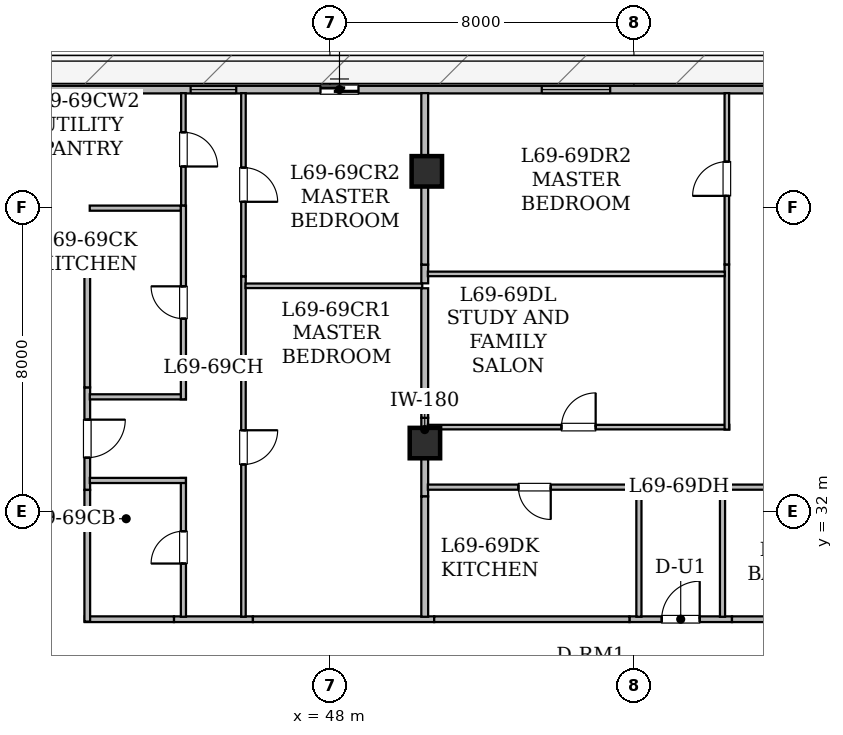
"""IFC4 building model, lengths in metres.
Left out: names, types, materials, properties, quantities, classifications, styles, units other than length and angle.
Written with IfcOpenShell. Run it as: python <this file> out.ifc"""

import sys

from ifc_helpers import new_model, si_unit, direction, frame, frame_2d, origin, origin_2d, place, context, subcontext, project, spatial, rectangle, hollow_rectangle, extrude, element, fill, save


model = new_model("IFC4")
c1 = context("Model", 3, precision=1e-05, world=origin(), true_north=direction((0.0, 1.0)))
c2 = subcontext(c1, "Body", "Model", "MODEL_VIEW")
j1 = project(units=[si_unit("LENGTHUNIT", "METRE"), si_unit("PLANEANGLEUNIT", "RADIAN")], contexts=[c1])
p1 = place(None, origin())
s1 = spatial("IfcSite", under=j1, at=p1, CompositionType="ELEMENT")
p2 = place(p1, origin())
s2 = spatial("IfcBuilding", under=s1, at=p2, CompositionType="ELEMENT")
p3 = place(p2, frame((0.0, 0.0, 269.45)))
s3 = spatial("IfcBuildingStorey", under=s2, at=p3, CompositionType="ELEMENT", Elevation=269.45)
for number, where, z_axis, x_axis in (
    (1, (50.55, 40.95, 0.025), (0.0, 0.0, 1.0), (1.0, 0.0, 0.0)),
    (2, (50.5, 33.8, 0.025), (0.0, 0.0, 1.0), (1.0, 0.0, 0.0)),
):
    element("IfcColumn", number, at=place(p3, frame(where, z_axis=z_axis, x_axis=x_axis)), inside=s3, PredefinedType="COLUMN", context=c2, shape_type="SweptSolid", body=[
        extrude(hollow_rectangle(XDim=0.8, YDim=0.8, WallThickness=0.04, at=origin_2d()), origin(), (0.0, 0.0, 1.0), 4.175),
    ])
p4 = place(p3, frame((25.702, 43.1, 0.0), z_axis=(0.0, 0.0, 1.0), x_axis=(1.0, 0.0, 0.0)))
e3 = element("IfcWall", 3, at=p4, inside=s3, PredefinedType="STANDARD", context=c2, shape_type="SweptSolid", body=[
    extrude(rectangle(XDim=38.657, YDim=0.2, at=frame_2d((19.329, 0.0))), origin(), (0.0, 0.0, 1.0), 3.95),
])
p5 = place(p4, frame((22.05, 0.0, 0.0)))
e4 = element("IfcOpeningElement", 4, at=p5, cuts=e3, PredefinedType="OPENING", context=c2, shape_type="SweptSolid", body=[
    extrude(rectangle(XDim=1.0, YDim=2.15, at=frame_2d((0.5, 1.075))), frame((0.0, 0.11, 0.0), z_axis=(0.0, -1.0, 0.0), x_axis=(1.0, 0.0, 0.0)), (0.0, 0.0, 1.0), 0.22),
])
p6 = place(p4, frame((18.633, 0.0, 0.78)))
e5 = element("IfcOpeningElement", 5, at=p6, cuts=e3, PredefinedType="OPENING", context=c2, shape_type="SweptSolid", body=[
    extrude(rectangle(XDim=1.2, YDim=1.5, at=frame_2d((0.6, 0.75))), frame((0.0, 0.11, 0.0), z_axis=(0.0, -1.0, 0.0), x_axis=(1.0, 0.0, 0.0)), (0.0, 0.0, 1.0), 0.22),
])
p7 = place(p4, frame((27.873, 0.0, 0.85)))
e6 = element("IfcOpeningElement", 6, at=p7, cuts=e3, PredefinedType="OPENING", context=c2, shape_type="SweptSolid", body=[
    extrude(rectangle(XDim=1.8, YDim=0.92, at=frame_2d((0.9, 0.46))), frame((0.0, 0.11, 0.0), z_axis=(0.0, -1.0, 0.0), x_axis=(1.0, 0.0, 0.0)), (0.0, 0.0, 1.0), 0.22),
])
p8 = place(p4, frame((35.193, 0.0, 0.85)))
e7 = element("IfcOpeningElement", 7, at=p8, cuts=e3, PredefinedType="OPENING", context=c2, shape_type="SweptSolid", body=[
    extrude(rectangle(XDim=1.8, YDim=0.92, at=frame_2d((0.9, 0.46))), frame((0.0, 0.11, 0.0), z_axis=(0.0, -1.0, 0.0), x_axis=(1.0, 0.0, 0.0)), (0.0, 0.0, 1.0), 0.22),
])
p9 = place(p3, frame((43.896, 29.165, 0.0), z_axis=(0.0, 0.0, 1.0), x_axis=(1.0, 0.0, 0.0)))
e8 = element("IfcWall", 8, at=p9, inside=s3, PredefinedType="STANDARD", context=c2, shape_type="SweptSolid", body=[
    extrude(rectangle(XDim=2.078, YDim=0.15, at=frame_2d((1.039, 0.0))), origin(), (0.0, 0.0, 1.0), 3.95),
])
p10 = place(p3, frame((41.615, 35.265, 0.0), z_axis=(0.0, 0.0, 1.0), x_axis=(0.0, -1.0, 0.0)))
e9 = element("IfcWall", 9, at=p10, inside=s3, PredefinedType="STANDARD", context=c2, shape_type="SweptSolid", body=[
    extrude(rectangle(XDim=2.698, YDim=0.15, at=frame_2d((1.349, 0.0))), origin(), (0.0, 0.0, 1.0), 3.481),
])
p11 = place(p10, frame((0.849, 0.0, 0.0)))
e10 = element("IfcOpeningElement", 10, at=p11, cuts=e9, PredefinedType="OPENING", context=c2, shape_type="SweptSolid", body=[
    extrude(rectangle(XDim=1.0, YDim=2.15, at=frame_2d((0.5, 1.075))), frame((0.0, 0.085, 0.0), z_axis=(0.0, -1.0, 0.0), x_axis=(1.0, 0.0, 0.0)), (0.0, 0.0, 1.0), 0.17),
])
p12 = place(p3, frame((41.55, 29.165, 0.0), z_axis=(0.0, 0.0, 1.0), x_axis=(1.0, 0.0, 0.0)))
e11 = element("IfcWall", 11, at=p12, inside=s3, PredefinedType="STANDARD", context=c2, shape_type="SweptSolid", body=[
    extrude(rectangle(XDim=2.346, YDim=0.15, at=frame_2d((1.173, 0.0))), origin(), (0.0, 0.0, 1.0), 3.95),
])
p13 = place(p3, frame((41.615, 32.567, 0.0), z_axis=(0.0, 0.0, 1.0), x_axis=(0.0, -1.0, 0.0)))
e12 = element("IfcWall", 12, at=p13, inside=s3, PredefinedType="STANDARD", context=c2, shape_type="SweptSolid", body=[
    extrude(rectangle(XDim=3.465, YDim=0.15, at=frame_2d((1.732, 0.0))), origin(), (0.0, 0.0, 1.0), 3.95),
])
p14 = place(p3, frame((41.615, 38.4, 0.0), z_axis=(0.0, 0.0, 1.0), x_axis=(0.0, -1.0, 0.0)))
e13 = element("IfcWall", 13, at=p14, inside=s3, PredefinedType="STANDARD", context=c2, shape_type="SweptSolid", body=[
    extrude(rectangle(XDim=3.135, YDim=0.15, at=frame_2d((1.567, 0.0))), origin(), (0.0, 0.0, 1.0), 3.245),
])
p15 = place(p3, frame((45.974, 29.165, 0.0), z_axis=(0.0, 0.0, 1.0), x_axis=(1.0, 0.0, 0.0)))
e14 = element("IfcWall", 14, at=p15, inside=s3, PredefinedType="STANDARD", context=c2, shape_type="SweptSolid", body=[
    extrude(rectangle(XDim=4.77, YDim=0.15, at=frame_2d((2.385, 0.0))), origin(), (0.0, 0.0, 1.0), 3.245),
])
p16 = place(p3, frame((55.882, 29.165, 0.0), z_axis=(0.0, 0.0, 1.0), x_axis=(1.0, 0.0, 0.0)))
e15 = element("IfcWall", 15, at=p16, inside=s3, PredefinedType="STANDARD", context=c2, shape_type="SweptSolid", body=[
    extrude(rectangle(XDim=2.698, YDim=0.15, at=frame_2d((1.349, 0.0))), origin(), (0.0, 0.0, 1.0), 3.95),
])
p17 = place(p16, frame((0.849, 0.0, 0.0)))
e16 = element("IfcOpeningElement", 16, at=p17, cuts=e15, PredefinedType="OPENING", context=c2, shape_type="SweptSolid", body=[
    extrude(rectangle(XDim=1.0, YDim=2.15, at=frame_2d((0.5, 1.075))), frame((0.0, 0.085, 0.0), z_axis=(0.0, -1.0, 0.0), x_axis=(1.0, 0.0, 0.0)), (0.0, 0.0, 1.0), 0.17),
])
p18 = place(p3, frame((58.58, 29.165, 0.0), z_axis=(0.0, 0.0, 1.0), x_axis=(1.0, 0.0, 0.0)))
e17 = element("IfcWall", 17, at=p18, inside=s3, PredefinedType="STANDARD", context=c2, shape_type="SweptSolid", body=[
    extrude(rectangle(XDim=4.367, YDim=0.15, at=frame_2d((2.184, 0.0))), origin(), (0.0, 0.0, 1.0), 3.95),
])
p19 = place(p3, frame((50.744, 29.165, 0.0), z_axis=(0.0, 0.0, 1.0), x_axis=(1.0, 0.0, 0.0)))
e18 = element("IfcWall", 18, at=p19, inside=s3, PredefinedType="STANDARD", context=c2, shape_type="SweptSolid", body=[
    extrude(rectangle(XDim=5.138, YDim=0.15, at=frame_2d((2.569, 0.0))), origin(), (0.0, 0.0, 1.0), 3.95),
])
p20 = place(p3, frame((44.145, 43.008, 0.0), z_axis=(0.0, 0.0, 1.0), x_axis=(0.0, -1.0, 0.0)))
e19 = element("IfcWall", 19, at=p20, inside=s3, PredefinedType="PARTITIONING", context=c2, shape_type="SweptSolid", body=[
    extrude(rectangle(XDim=2.962, YDim=0.12, at=frame_2d((1.481, 0.0))), origin(), (0.0, 0.0, 1.0), 3.407),
])
p21 = place(p20, frame((1.031, 0.0, 0.0)))
e20 = element("IfcOpeningElement", 20, at=p21, cuts=e19, PredefinedType="OPENING", context=c2, shape_type="SweptSolid", body=[
    extrude(rectangle(XDim=0.9, YDim=2.1, at=frame_2d((0.45, 1.05))), frame((0.0, 0.07, 0.0), z_axis=(0.0, -1.0, 0.0), x_axis=(1.0, 0.0, 0.0)), (0.0, 0.0, 1.0), 0.14),
])
p22 = place(p3, frame((44.08, 39.981, 0.0), z_axis=(0.0, 0.0, 1.0), x_axis=(-1.0, 0.0, 0.0)))
e21 = element("IfcWall", 21, at=p22, inside=s3, PredefinedType="PARTITIONING", context=c2, shape_type="SweptSolid", body=[
    extrude(rectangle(XDim=2.4, YDim=0.135, at=frame_2d((1.2, 0.0))), origin(), (0.0, 0.0, 1.0), 3.95),
])
p23 = place(p3, frame((44.145, 29.23, 0.0), z_axis=(0.0, 0.0, 1.0), x_axis=(0.0, 1.0, 0.0)))
e22 = element("IfcWall", 22, at=p23, inside=s3, PredefinedType="PARTITIONING", context=c2, shape_type="SweptSolid", body=[
    extrude(rectangle(XDim=3.651, YDim=0.135, at=frame_2d((1.826, 0.0))), origin(), (0.0, 0.0, 1.0), 3.95),
])
p24 = place(p23, frame((1.4, 0.0, 0.0)))
e23 = element("IfcOpeningElement", 23, at=p24, cuts=e22, PredefinedType="OPENING", context=c2, shape_type="SweptSolid", body=[
    extrude(rectangle(XDim=0.85, YDim=2.1, at=frame_2d((0.425, 1.05))), frame((0.0, 0.077, 0.0), z_axis=(0.0, -1.0, 0.0), x_axis=(1.0, 0.0, 0.0)), (0.0, 0.0, 1.0), 0.155),
])
for number, where, z_axis, x_axis in (
    (24, (44.21, 32.816, 0.0), (0.0, 0.0, 1.0), (-1.0, 0.0, 0.0)),
    (25, (41.682, 35.016, 0.0), (0.0, 0.0, 1.0), (1.0, 0.0, 0.0)),
):
    element("IfcWall", number, at=place(p3, frame(where, z_axis=z_axis, x_axis=x_axis)), inside=s3, PredefinedType="PARTITIONING", context=c2, shape_type="SweptSolid", body=[
        extrude(rectangle(XDim=2.528, YDim=0.135, at=frame_2d((1.264, 0.0))), origin(), (0.0, 0.0, 1.0), 3.95),
    ])
p25 = place(p3, frame((44.145, 34.951, 0.0), z_axis=(0.0, 0.0, 1.0), x_axis=(0.0, 1.0, 0.0)))
e26 = element("IfcWall", 26, at=p25, inside=s3, PredefinedType="PARTITIONING", context=c2, shape_type="SweptSolid", body=[
    extrude(rectangle(XDim=5.095, YDim=0.135, at=frame_2d((2.547, 0.0))), origin(), (0.0, 0.0, 1.0), 3.245),
])
p26 = place(p25, frame((2.123, 0.0, 0.0)))
e27 = element("IfcOpeningElement", 27, at=p26, cuts=e26, PredefinedType="OPENING", context=c2, shape_type="SweptSolid", body=[
    extrude(rectangle(XDim=0.85, YDim=2.1, at=frame_2d((0.425, 1.05))), frame((0.0, 0.077, 0.0), z_axis=(0.0, -1.0, 0.0), x_axis=(1.0, 0.0, 0.0)), (0.0, 0.0, 1.0), 0.155),
])
p27 = place(p3, frame((45.725, 38.187, 0.0), z_axis=(0.0, 0.0, 1.0), x_axis=(0.0, -1.0, 0.0)))
e28 = element("IfcWall", 28, at=p27, inside=s3, PredefinedType="PARTITIONING", context=c2, shape_type="SweptSolid", body=[
    extrude(rectangle(XDim=8.957, YDim=0.12, at=frame_2d((4.479, 0.0))), origin(), (0.0, 0.0, 1.0), 3.245),
])
p28 = place(p27, frame((4.05, 0.0, 0.0)))
e29 = element("IfcOpeningElement", 29, at=p28, cuts=e28, PredefinedType="OPENING", context=c2, shape_type="SweptSolid", body=[
    extrude(rectangle(XDim=0.9, YDim=2.1, at=frame_2d((0.45, 1.05))), frame((0.0, 0.07, 0.0), z_axis=(0.0, -1.0, 0.0), x_axis=(1.0, 0.0, 0.0)), (0.0, 0.0, 1.0), 0.14),
])
p29 = place(p3, frame((45.725, 43.008, 0.0), z_axis=(0.0, 0.0, 1.0), x_axis=(0.0, -1.0, 0.0)))
e30 = element("IfcWall", 30, at=p29, inside=s3, PredefinedType="PARTITIONING", context=c2, shape_type="SweptSolid", body=[
    extrude(rectangle(XDim=4.821, YDim=0.12, at=frame_2d((2.411, 0.0))), origin(), (0.0, 0.0, 1.0), 3.407),
])
p30 = place(p29, frame((1.96, 0.0, 0.0)))
e31 = element("IfcOpeningElement", 31, at=p30, cuts=e30, PredefinedType="OPENING", context=c2, shape_type="SweptSolid", body=[
    extrude(rectangle(XDim=0.9, YDim=2.1, at=frame_2d((0.45, 1.05))), frame((0.0, 0.07, 0.0), z_axis=(0.0, -1.0, 0.0), x_axis=(1.0, 0.0, 0.0)), (0.0, 0.0, 1.0), 0.14),
])
p31 = place(p3, frame((45.779, 37.938, 0.0), z_axis=(0.0, 0.0, 1.0), x_axis=(1.0, 0.0, 0.0)))
e32 = element("IfcWall", 32, at=p31, inside=s3, PredefinedType="PARTITIONING", context=c2, shape_type="SweptSolid", body=[
    extrude(rectangle(XDim=4.651, YDim=0.12, at=frame_2d((2.325, 0.0))), origin(), (0.0, 0.0, 1.0), 3.245),
])
p32 = place(p3, frame((50.495, 34.464, 0.0), z_axis=(0.0, 0.0, 1.0), x_axis=(0.0, -1.0, 0.0)))
e33 = element("IfcWall", 33, at=p32, inside=s3, PredefinedType="STANDARD", context=c2, shape_type="SweptSolid", body=[
    extrude(rectangle(XDim=2.069, YDim=0.18, at=frame_2d((1.035, 0.0))), origin(), (0.0, 0.0, 1.0), 3.237),
])
p33 = place(p3, frame((50.495, 32.395, 0.0), z_axis=(0.0, 0.0, 1.0), x_axis=(0.0, -1.0, 0.0)))
e34 = element("IfcWall", 34, at=p33, inside=s3, PredefinedType="STANDARD", context=c2, shape_type="SweptSolid", body=[
    extrude(rectangle(XDim=3.165, YDim=0.18, at=frame_2d((1.583, 0.0))), origin(), (0.0, 0.0, 1.0), 3.237),
])
p34 = place(p3, frame((50.495, 37.873, 0.0), z_axis=(0.0, 0.0, 1.0), x_axis=(0.0, -1.0, 0.0)))
e35 = element("IfcWall", 35, at=p34, inside=s3, PredefinedType="STANDARD", context=c2, shape_type="SweptSolid", body=[
    extrude(rectangle(XDim=3.409, YDim=0.18, at=frame_2d((1.705, 0.0))), origin(), (0.0, 0.0, 1.0), 3.245),
])
p35 = place(p3, frame((50.495, 38.496, 0.0), z_axis=(0.0, 0.0, 1.0), x_axis=(0.0, -1.0, 0.0)))
e36 = element("IfcWall", 36, at=p35, inside=s3, PredefinedType="STANDARD", context=c2, shape_type="SweptSolid", body=[
    extrude(rectangle(XDim=0.493, YDim=0.18, at=frame_2d((0.247, 0.0))), origin(), (0.0, 0.0, 1.0), 3.245),
])
p36 = place(p3, frame((50.495, 43.008, 0.0), z_axis=(0.0, 0.0, 1.0), x_axis=(0.0, -1.0, 0.0)))
e37 = element("IfcWall", 37, at=p36, inside=s3, PredefinedType="STANDARD", context=c2, shape_type="SweptSolid", body=[
    extrude(rectangle(XDim=4.512, YDim=0.18, at=frame_2d((2.256, 0.0))), origin(), (0.0, 0.0, 1.0), 3.245),
])
p37 = place(p3, frame((63.261, 32.64, 0.0), z_axis=(0.0, 0.0, 1.0), x_axis=(-1.0, 0.0, 0.0)))
e38 = element("IfcWall", 38, at=p37, inside=s3, PredefinedType="PARTITIONING", context=c2, shape_type="SweptSolid", body=[
    extrude(rectangle(XDim=4.995, YDim=0.135, at=frame_2d((2.498, 0.0))), origin(), (0.0, 0.0, 1.0), 3.95),
])
p38 = place(p37, frame((2.073, 0.0, 0.0)))
e39 = element("IfcOpeningElement", 39, at=p38, cuts=e38, PredefinedType="OPENING", context=c2, shape_type="SweptSolid", body=[
    extrude(rectangle(XDim=0.85, YDim=2.1, at=frame_2d((0.425, 1.05))), frame((0.0, 0.077, 0.0), z_axis=(0.0, -1.0, 0.0), x_axis=(1.0, 0.0, 0.0)), (0.0, 0.0, 1.0), 0.155),
])
for number, where, z_axis, x_axis in (
    (40, (58.331, 32.705, 0.0), (0.0, 0.0, 1.0), (0.0, -1.0, 0.0)),
    (41, (56.131, 29.23, 0.0), (0.0, 0.0, 1.0), (0.0, 1.0, 0.0)),
):
    element("IfcWall", number, at=place(p3, frame(where, z_axis=z_axis, x_axis=x_axis)), inside=s3, PredefinedType="PARTITIONING", context=c2, shape_type="SweptSolid", body=[
        extrude(rectangle(XDim=3.475, YDim=0.135, at=frame_2d((1.738, 0.0))), origin(), (0.0, 0.0, 1.0), 3.237),
    ])
p39 = place(p3, frame((56.196, 32.64, 0.0), z_axis=(0.0, 0.0, 1.0), x_axis=(-1.0, 0.0, 0.0)))
e42 = element("IfcWall", 42, at=p39, inside=s3, PredefinedType="PARTITIONING", context=c2, shape_type="SweptSolid", body=[
    extrude(rectangle(XDim=5.619, YDim=0.135, at=frame_2d((2.81, 0.0))), origin(), (0.0, 0.0, 1.0), 3.245),
])
p40 = place(p39, frame((2.385, 0.0, 0.0)))
e43 = element("IfcOpeningElement", 43, at=p40, cuts=e42, PredefinedType="OPENING", context=c2, shape_type="SweptSolid", body=[
    extrude(rectangle(XDim=0.85, YDim=2.1, at=frame_2d((0.425, 1.05))), frame((0.0, 0.077, 0.0), z_axis=(0.0, -1.0, 0.0), x_axis=(1.0, 0.0, 0.0)), (0.0, 0.0, 1.0), 0.155),
])
p41 = place(p3, frame((50.577, 34.22, 0.0), z_axis=(0.0, 0.0, 1.0), x_axis=(1.0, 0.0, 0.0)))
e44 = element("IfcWall", 44, at=p41, inside=s3, PredefinedType="PARTITIONING", context=c2, shape_type="SweptSolid", body=[
    extrude(rectangle(XDim=7.933, YDim=0.12, at=frame_2d((3.967, 0.0))), origin(), (0.0, 0.0, 1.0), 3.237),
])
p42 = place(p41, frame((3.516, 0.0, 0.0)))
e45 = element("IfcOpeningElement", 45, at=p42, cuts=e44, PredefinedType="OPENING", context=c2, shape_type="SweptSolid", body=[
    extrude(rectangle(XDim=0.9, YDim=2.1, at=frame_2d((0.45, 1.05))), frame((0.0, 0.07, 0.0), z_axis=(0.0, -1.0, 0.0), x_axis=(1.0, 0.0, 0.0)), (0.0, 0.0, 1.0), 0.14),
])
p43 = place(p3, frame((58.445, 34.155, 0.0), z_axis=(0.0, 0.0, 1.0), x_axis=(0.0, 1.0, 0.0)))
e46 = element("IfcWall", 46, at=p43, inside=s3, PredefinedType="PARTITIONING", context=c2, shape_type="SweptSolid", body=[
    extrude(rectangle(XDim=4.345, YDim=0.12, at=frame_2d((2.172, 0.0))), origin(), (0.0, 0.0, 1.0), 3.237),
])
p44 = place(p3, frame((58.445, 38.5, 0.0), z_axis=(0.0, 0.0, 1.0), x_axis=(0.0, 1.0, 0.0)))
e47 = element("IfcWall", 47, at=p44, inside=s3, PredefinedType="PARTITIONING", context=c2, shape_type="SweptSolid", body=[
    extrude(rectangle(XDim=4.508, YDim=0.12, at=frame_2d((2.254, 0.0))), origin(), (0.0, 0.0, 1.0), 3.245),
])
p45 = place(p44, frame((1.804, 0.0, 0.0)))
e48 = element("IfcOpeningElement", 48, at=p45, cuts=e47, PredefinedType="OPENING", context=c2, shape_type="SweptSolid", body=[
    extrude(rectangle(XDim=0.9, YDim=2.1, at=frame_2d((0.45, 1.05))), frame((0.0, 0.07, 0.0), z_axis=(0.0, -1.0, 0.0), x_axis=(1.0, 0.0, 0.0)), (0.0, 0.0, 1.0), 0.14),
])
p46 = place(p3, frame((50.577, 38.251, 0.0), z_axis=(0.0, 0.0, 1.0), x_axis=(1.0, 0.0, 0.0)))
e49 = element("IfcWall", 49, at=p46, inside=s3, PredefinedType="PARTITIONING", context=c2, shape_type="SweptSolid", body=[
    extrude(rectangle(XDim=7.814, YDim=0.12, at=frame_2d((3.907, 0.0))), origin(), (0.0, 0.0, 1.0), 3.245),
])
p47 = place(p5, origin())
e50 = element("IfcDoor", 50, at=p47, inside=s3, OperationType="SLIDING_TO_LEFT", PredefinedType="DOOR", context=c2, shape_type="SweptSolid", body=[
    extrude(rectangle(XDim=1.0, YDim=2.15, at=frame_2d((0.5, 1.075))), frame((0.0, 0.025, 0.0), z_axis=(0.0, -1.0, 0.0), x_axis=(1.0, 0.0, 0.0)), (0.0, 0.0, 1.0), 0.05),
])
fill(e4, e50)
p48 = place(p6, origin())
e51 = element("IfcWindow", 51, at=p48, inside=s3, PartitioningType="SINGLE_PANEL", PredefinedType="WINDOW", context=c2, shape_type="SweptSolid", body=[
    extrude(rectangle(XDim=1.2, YDim=1.5, at=frame_2d((0.6, 0.75))), frame((0.0, 0.03, 0.0), z_axis=(0.0, -1.0, 0.0), x_axis=(1.0, 0.0, 0.0)), (0.0, 0.0, 1.0), 0.06),
])
fill(e5, e51)
p49 = place(p7, origin())
e52 = element("IfcWindow", 52, at=p49, inside=s3, PartitioningType="SINGLE_PANEL", PredefinedType="WINDOW", context=c2, shape_type="SweptSolid", body=[
    extrude(rectangle(XDim=1.8, YDim=0.92, at=frame_2d((0.9, 0.46))), frame((0.0, 0.03, 0.0), z_axis=(0.0, -1.0, 0.0), x_axis=(1.0, 0.0, 0.0)), (0.0, 0.0, 1.0), 0.06),
])
fill(e6, e52)
p50 = place(p11, origin())
e53 = element("IfcDoor", 53, at=p50, inside=s3, OperationType="SINGLE_SWING_LEFT", PredefinedType="DOOR", context=c2, shape_type="SweptSolid", body=[
    extrude(rectangle(XDim=1.0, YDim=2.15, at=frame_2d((0.5, 1.075))), frame((0.0, 0.025, 0.0), z_axis=(0.0, -1.0, 0.0), x_axis=(1.0, 0.0, 0.0)), (0.0, 0.0, 1.0), 0.05),
])
fill(e10, e53)
p51 = place(p17, origin())
e54 = element("IfcDoor", 54, at=p51, inside=s3, OperationType="SINGLE_SWING_RIGHT", PredefinedType="DOOR", context=c2, shape_type="SweptSolid", body=[
    extrude(rectangle(XDim=1.0, YDim=2.15, at=frame_2d((0.5, 1.075))), frame((0.0, 0.025, 0.0), z_axis=(0.0, -1.0, 0.0), x_axis=(1.0, 0.0, 0.0)), (0.0, 0.0, 1.0), 0.05),
])
fill(e16, e54)
p52 = place(p21, origin())
e55 = element("IfcDoor", 55, at=p52, inside=s3, OperationType="SINGLE_SWING_RIGHT", PredefinedType="DOOR", context=c2, shape_type="SweptSolid", body=[
    extrude(rectangle(XDim=0.9, YDim=2.1, at=frame_2d((0.45, 1.05))), frame((0.0, 0.025, 0.0), z_axis=(0.0, -1.0, 0.0), x_axis=(1.0, 0.0, 0.0)), (0.0, 0.0, 1.0), 0.05),
])
fill(e20, e55)
p53 = place(p24, origin())
e56 = element("IfcDoor", 56, at=p53, inside=s3, OperationType="SINGLE_SWING_LEFT", PredefinedType="DOOR", context=c2, shape_type="SweptSolid", body=[
    extrude(rectangle(XDim=0.85, YDim=2.1, at=frame_2d((0.425, 1.05))), frame((0.0, 0.025, 0.0), z_axis=(0.0, -1.0, 0.0), x_axis=(1.0, 0.0, 0.0)), (0.0, 0.0, 1.0), 0.05),
])
fill(e23, e56)
p54 = place(p26, origin())
e57 = element("IfcDoor", 57, at=p54, inside=s3, OperationType="SINGLE_SWING_RIGHT", PredefinedType="DOOR", context=c2, shape_type="SweptSolid", body=[
    extrude(rectangle(XDim=0.85, YDim=2.1, at=frame_2d((0.425, 1.05))), frame((0.0, 0.025, 0.0), z_axis=(0.0, -1.0, 0.0), x_axis=(1.0, 0.0, 0.0)), (0.0, 0.0, 1.0), 0.05),
])
fill(e27, e57)
p55 = place(p28, origin())
e58 = element("IfcDoor", 58, at=p55, inside=s3, OperationType="SINGLE_SWING_LEFT", PredefinedType="DOOR", context=c2, shape_type="SweptSolid", body=[
    extrude(rectangle(XDim=0.9, YDim=2.1, at=frame_2d((0.45, 1.05))), frame((0.0, 0.025, 0.0), z_axis=(0.0, -1.0, 0.0), x_axis=(1.0, 0.0, 0.0)), (0.0, 0.0, 1.0), 0.05),
])
fill(e29, e58)
p56 = place(p30, origin())
e59 = element("IfcDoor", 59, at=p56, inside=s3, OperationType="SINGLE_SWING_RIGHT", PredefinedType="DOOR", context=c2, shape_type="SweptSolid", body=[
    extrude(rectangle(XDim=0.9, YDim=2.1, at=frame_2d((0.45, 1.05))), frame((0.0, 0.025, 0.0), z_axis=(0.0, -1.0, 0.0), x_axis=(1.0, 0.0, 0.0)), (0.0, 0.0, 1.0), 0.05),
])
fill(e31, e59)
p57 = place(p40, origin())
e60 = element("IfcDoor", 60, at=p57, inside=s3, OperationType="SINGLE_SWING_LEFT", PredefinedType="DOOR", context=c2, shape_type="SweptSolid", body=[
    extrude(rectangle(XDim=0.85, YDim=2.1, at=frame_2d((0.425, 1.05))), frame((0.0, 0.025, 0.0), z_axis=(0.0, -1.0, 0.0), x_axis=(1.0, 0.0, 0.0)), (0.0, 0.0, 1.0), 0.05),
])
fill(e43, e60)
p58 = place(p42, origin())
e61 = element("IfcDoor", 61, at=p58, inside=s3, OperationType="SINGLE_SWING_RIGHT", PredefinedType="DOOR", context=c2, shape_type="SweptSolid", body=[
    extrude(rectangle(XDim=0.9, YDim=2.1, at=frame_2d((0.45, 1.05))), frame((0.0, 0.025, 0.0), z_axis=(0.0, -1.0, 0.0), x_axis=(1.0, 0.0, 0.0)), (0.0, 0.0, 1.0), 0.05),
])
fill(e45, e61)
p59 = place(p45, origin())
e62 = element("IfcDoor", 62, at=p59, inside=s3, OperationType="SINGLE_SWING_LEFT", PredefinedType="DOOR", context=c2, shape_type="SweptSolid", body=[
    extrude(rectangle(XDim=0.9, YDim=2.1, at=frame_2d((0.45, 1.05))), frame((0.0, 0.025, 0.0), z_axis=(0.0, -1.0, 0.0), x_axis=(1.0, 0.0, 0.0)), (0.0, 0.0, 1.0), 0.05),
])
fill(e48, e62)
save(model, sys.argv[1])
